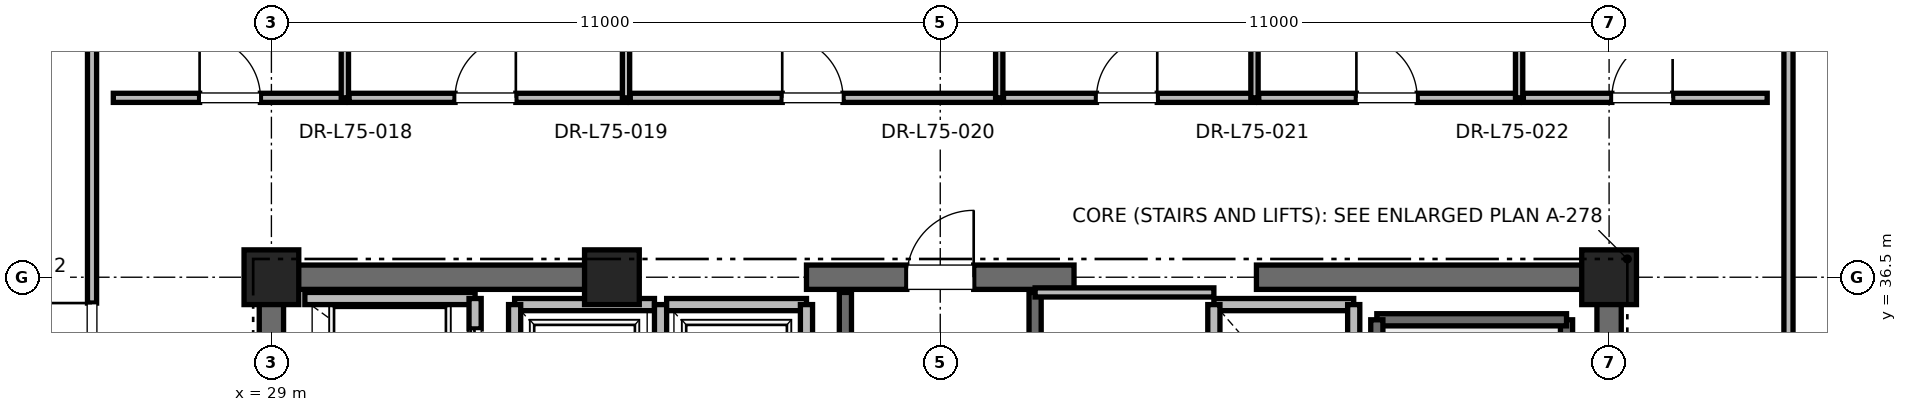
"""IFC4 building model, lengths in metres.
Left out: names, types, materials, properties, quantities, classifications, styles, units other than length and angle.
Written with IfcOpenShell. Run it as: python <this file> out.ifc"""

import sys

from ifc_helpers import new_model, si_unit, direction, frame, frame_2d, origin, origin_2d, place, context, subcontext, project, spatial, rectangle, extrude, element, fill, save


model = new_model("IFC4")
c1 = context("Model", 3, precision=1e-05, world=origin(), true_north=direction((0.0, 1.0)))
c2 = subcontext(c1, "Body", "Model", "MODEL_VIEW")
j1 = project(units=[si_unit("LENGTHUNIT", "METRE"), si_unit("PLANEANGLEUNIT", "RADIAN")], contexts=[c1])
p1 = place(None, origin())
s1 = spatial("IfcSite", under=j1, at=p1, CompositionType="ELEMENT")
p2 = place(p1, origin())
s2 = spatial("IfcBuilding", under=s1, at=p2, CompositionType="ELEMENT")
p3 = place(p2, frame((0.0, 0.0, 322.8)))
s3 = spatial("IfcBuildingStorey", under=s2, at=p3, CompositionType="ELEMENT", Elevation=322.8)
for number, where, z_axis, x_axis in (
    (1, (29.0, 36.5, 0.0), (0.0, 0.0, 1.0), (1.0, 0.0, 0.0)),
    (2, (51.0, 36.5, 0.0), (0.0, 0.0, 1.0), (1.0, 0.0, 0.0)),
    (3, (34.6, 36.5, 0.0), (0.0, 0.0, 1.0), (1.0, 0.0, 0.0)),
):
    element("IfcColumn", number, at=place(p3, frame(where, z_axis=z_axis, x_axis=x_axis)), inside=s3, PredefinedType="PILASTER", context=c2, shape_type="SweptSolid", body=[
        extrude(rectangle(XDim=0.9, YDim=0.9, at=origin_2d()), origin(), (0.0, 0.0, 1.0), 4.0),
    ])
p4 = place(p3, frame((29.0, 36.5, 0.0), z_axis=(0.0, 0.0, 1.0), x_axis=(1.0, 0.0, 0.0)))
e4 = element("IfcWall", 4, at=p4, inside=s3, PredefinedType="SHEAR", context=c2, shape_type="SweptSolid", body=[
    extrude(rectangle(XDim=5.8, YDim=0.4, at=frame_2d((2.9, 0.0))), origin(), (0.0, 0.0, 1.0), 3.785),
])
p5 = place(p3, frame((37.8, 36.5, 0.0), z_axis=(0.0, 0.0, 1.0), x_axis=(1.0, 0.0, 0.0)))
e5 = element("IfcWall", 5, at=p5, inside=s3, PredefinedType="SHEAR", context=c2, shape_type="SweptSolid", body=[
    extrude(rectangle(XDim=4.4, YDim=0.4, at=frame_2d((2.2, 0.0))), origin(), (0.0, 0.0, 1.0), 3.785),
])
p6 = place(p5, frame((1.65, 0.0, 0.0)))
e6 = element("IfcOpeningElement", 6, at=p6, cuts=e5, PredefinedType="OPENING", context=c2, shape_type="SweptSolid", body=[
    extrude(rectangle(XDim=1.1, YDim=2.15, at=frame_2d((0.55, 1.075))), frame((0.0, 0.2, 0.0), z_axis=(0.0, -1.0, 0.0), x_axis=(1.0, 0.0, 0.0)), (0.0, 0.0, 1.0), 0.4),
])
for number, where, z_axis, x_axis in (
    (7, (45.2, 36.5, 0.0), (0.0, 0.0, 1.0), (1.0, 0.0, 0.0)),
    (8, (29.0, 30.7, 0.0), (0.0, 0.0, 1.0), (0.0, 1.0, 0.0)),
):
    element("IfcWall", number, at=place(p3, frame(where, z_axis=z_axis, x_axis=x_axis)), inside=s3, PredefinedType="SHEAR", context=c2, shape_type="SweptSolid", body=[
        extrude(rectangle(XDim=5.8, YDim=0.4, at=frame_2d((2.9, 0.0))), origin(), (0.0, 0.0, 1.0), 3.785),
    ])
p7 = place(p3, frame((51.0, 27.7, 0.0), z_axis=(0.0, 0.0, 1.0), x_axis=(0.0, 1.0, 0.0)))
e9 = element("IfcWall", 9, at=p7, inside=s3, PredefinedType="SHEAR", context=c2, shape_type="SweptSolid", body=[
    extrude(rectangle(XDim=8.8, YDim=0.4, at=frame_2d((4.4, 0.0))), origin(), (0.0, 0.0, 1.0), 3.785),
])
p8 = place(p3, frame((50.3, 27.65, 0.0), z_axis=(0.0, 0.0, 1.0), x_axis=(0.0, 1.0, 0.0)))
e10 = element("IfcWall", 10, at=p8, inside=s3, PredefinedType="SOLIDWALL", context=c2, shape_type="SweptSolid", body=[
    extrude(rectangle(XDim=8.15, YDim=0.2, at=frame_2d((4.075, 0.0))), origin(), (0.0, 0.0, 1.0), 3.785),
])
p9 = place(p3, frame((47.18, 35.8, 0.0), z_axis=(0.0, 0.0, 1.0), x_axis=(1.0, 0.0, 0.0)))
e11 = element("IfcWall", 11, at=p9, inside=s3, PredefinedType="SOLIDWALL", context=c2, shape_type="SweptSolid", body=[
    extrude(rectangle(XDim=3.12, YDim=0.2, at=frame_2d((1.56, 0.0))), origin(), (0.0, 0.0, 1.0), 3.785),
])
p10 = place(p3, frame((47.18, 27.62, 0.0), z_axis=(0.0, 0.0, 1.0), x_axis=(0.0, 1.0, 0.0)))
e12 = element("IfcWall", 12, at=p10, inside=s3, PredefinedType="SOLIDWALL", context=c2, shape_type="SweptSolid", body=[
    extrude(rectangle(XDim=8.18, YDim=0.2, at=frame_2d((4.09, 0.0))), origin(), (0.0, 0.0, 1.0), 3.785),
])
p11 = place(p3, frame((38.44, 27.38, 0.0), z_axis=(0.0, 0.0, 1.0), x_axis=(0.0, 1.0, 0.0)))
e13 = element("IfcWall", 13, at=p11, inside=s3, PredefinedType="SOLIDWALL", context=c2, shape_type="SweptSolid", body=[
    extrude(rectangle(XDim=8.87, YDim=0.2, at=frame_2d((4.435, 0.0))), origin(), (0.0, 0.0, 1.0), 3.785),
])
p12 = place(p3, frame((41.56, 27.68, 0.0), z_axis=(0.0, 0.0, 1.0), x_axis=(0.0, 1.0, 0.0)))
e14 = element("IfcWall", 14, at=p12, inside=s3, PredefinedType="SOLIDWALL", context=c2, shape_type="SweptSolid", body=[
    extrude(rectangle(XDim=8.57, YDim=0.2, at=frame_2d((4.285, 0.0))), origin(), (0.0, 0.0, 1.0), 3.785),
])
p13 = place(p3, frame((32.35, 36.15, 0.0), z_axis=(0.0, 0.0, 1.0), x_axis=(-1.0, 0.0, 0.0)))
e15 = element("IfcWall", 15, at=p13, inside=s3, PredefinedType="SOLIDWALL", context=c2, shape_type="SweptSolid", body=[
    extrude(rectangle(XDim=2.8, YDim=0.2, at=frame_2d((1.4, 0.0))), origin(), (0.0, 0.0, 1.0), 3.22),
])
p14 = place(p3, frame((32.35, 34.05, 0.0), z_axis=(0.0, 0.0, 1.0), x_axis=(0.0, 1.0, 0.0)))
e16 = element("IfcWall", 16, at=p14, inside=s3, PredefinedType="SOLIDWALL", context=c2, shape_type="SweptSolid", body=[
    extrude(rectangle(XDim=2.1, YDim=0.2, at=frame_2d((1.05, 0.0))), origin(), (0.0, 0.0, 1.0), 3.785),
])
p15 = place(p14, frame((0.5, 0.0, 0.0)))
e17 = element("IfcOpeningElement", 17, at=p15, cuts=e16, PredefinedType="OPENING", context=c2, shape_type="SweptSolid", body=[
    extrude(rectangle(XDim=1.1, YDim=2.2, at=frame_2d((0.55, 1.1))), frame((0.0, 0.1, 0.0), z_axis=(0.0, -1.0, 0.0), x_axis=(1.0, 0.0, 0.0)), (0.0, 0.0, 1.0), 0.2),
])
p16 = place(p3, frame((35.3, 36.05, 0.0), z_axis=(0.0, 0.0, 1.0), x_axis=(-1.0, 0.0, 0.0)))
e18 = element("IfcWall", 18, at=p16, inside=s3, PredefinedType="SOLIDWALL", context=c2, shape_type="SweptSolid", body=[
    extrude(rectangle(XDim=2.3, YDim=0.2, at=frame_2d((1.15, 0.0))), origin(), (0.0, 0.0, 1.0), 2.865),
])
p17 = place(p3, frame((33.0, 36.05, 0.0), z_axis=(0.0, 0.0, 1.0), x_axis=(0.0, -1.0, 0.0)))
e19 = element("IfcWall", 19, at=p17, inside=s3, PredefinedType="SOLIDWALL", context=c2, shape_type="SweptSolid", body=[
    extrude(rectangle(XDim=2.6, YDim=0.2, at=frame_2d((1.3, 0.0))), origin(), (0.0, 0.0, 1.0), 3.785),
])
p18 = place(p3, frame((35.4, 33.45, 0.0), z_axis=(0.0, 0.0, 1.0), x_axis=(0.0, 1.0, 0.0)))
e20 = element("IfcWall", 20, at=p18, inside=s3, PredefinedType="SOLIDWALL", context=c2, shape_type="SweptSolid", body=[
    extrude(rectangle(XDim=2.6, YDim=0.2, at=frame_2d((1.3, 0.0))), origin(), (0.0, 0.0, 1.0), 2.865),
])
p19 = place(p3, frame((37.8, 36.05, 0.0), z_axis=(0.0, 0.0, 1.0), x_axis=(-1.0, 0.0, 0.0)))
e21 = element("IfcWall", 21, at=p19, inside=s3, PredefinedType="SOLIDWALL", context=c2, shape_type="SweptSolid", body=[
    extrude(rectangle(XDim=2.3, YDim=0.2, at=frame_2d((1.15, 0.0))), origin(), (0.0, 0.0, 1.0), 2.865),
])
p20 = place(p3, frame((37.8, 33.45, 0.0), z_axis=(0.0, 0.0, 1.0), x_axis=(0.0, 1.0, 0.0)))
e22 = element("IfcWall", 22, at=p20, inside=s3, PredefinedType="SOLIDWALL", context=c2, shape_type="SweptSolid", body=[
    extrude(rectangle(XDim=2.6, YDim=0.2, at=frame_2d((1.3, 0.0))), origin(), (0.0, 0.0, 1.0), 2.865),
])
p21 = place(p3, frame((46.8, 36.05, 0.0), z_axis=(0.0, 0.0, 1.0), x_axis=(-1.0, 0.0, 0.0)))
e23 = element("IfcWall", 23, at=p21, inside=s3, PredefinedType="SOLIDWALL", context=c2, shape_type="SweptSolid", body=[
    extrude(rectangle(XDim=2.3, YDim=0.2, at=frame_2d((1.15, 0.0))), origin(), (0.0, 0.0, 1.0), 2.865),
])
p22 = place(p3, frame((44.5, 36.05, 0.0), z_axis=(0.0, 0.0, 1.0), x_axis=(0.0, -1.0, 0.0)))
e24 = element("IfcWall", 24, at=p22, inside=s3, PredefinedType="SOLIDWALL", context=c2, shape_type="SweptSolid", body=[
    extrude(rectangle(XDim=2.6, YDim=0.2, at=frame_2d((1.3, 0.0))), origin(), (0.0, 0.0, 1.0), 2.865),
])
p23 = place(p3, frame((46.8, 33.45, 0.0), z_axis=(0.0, 0.0, 1.0), x_axis=(0.0, 1.0, 0.0)))
e25 = element("IfcWall", 25, at=p23, inside=s3, PredefinedType="SOLIDWALL", context=c2, shape_type="SweptSolid", body=[
    extrude(rectangle(XDim=2.6, YDim=0.2, at=frame_2d((1.3, 0.0))), origin(), (0.0, 0.0, 1.0), 3.785),
])
p24 = place(p3, frame((41.56, 36.25, 0.0), z_axis=(0.0, 0.0, 1.0), x_axis=(1.0, 0.0, 0.0)))
e26 = element("IfcWall", 26, at=p24, inside=s3, PredefinedType="PARTITIONING", context=c2, shape_type="SweptSolid", body=[
    extrude(rectangle(XDim=2.94, YDim=0.15, at=frame_2d((1.47, 0.0))), origin(), (0.0, 0.0, 1.0), 2.85),
])
p25 = place(p3, frame((26.4, 39.45, 0.0), z_axis=(0.0, 0.0, 1.0), x_axis=(1.0, 0.0, 0.0)))
e27 = element("IfcWall", 27, at=p25, inside=s3, PredefinedType="PARTITIONING", context=c2, shape_type="SweptSolid", body=[
    extrude(rectangle(XDim=3.808, YDim=0.15, at=frame_2d((1.904, 0.0))), origin(), (0.0, 0.0, 1.0), 2.85),
])
p26 = place(p25, frame((1.419, 0.0, 0.0)))
e28 = element("IfcOpeningElement", 28, at=p26, cuts=e27, PredefinedType="OPENING", context=c2, shape_type="SweptSolid", body=[
    extrude(rectangle(XDim=1.0, YDim=2.15, at=frame_2d((0.5, 1.075))), frame((0.0, 0.075, 0.0), z_axis=(0.0, -1.0, 0.0), x_axis=(1.0, 0.0, 0.0)), (0.0, 0.0, 1.0), 0.15),
])
p27 = place(p3, frame((30.208, 39.45, 0.0), z_axis=(0.0, 0.0, 1.0), x_axis=(0.0, 1.0, 0.0)))
e29 = element("IfcWall", 29, at=p27, inside=s3, PredefinedType="PARTITIONING", context=c2, shape_type="SweptSolid", body=[
    extrude(rectangle(XDim=9.6, YDim=0.12, at=frame_2d((4.8, 0.0))), origin(), (0.0, 0.0, 1.0), 2.415),
])
p28 = place(p3, frame((30.278, 39.45, 0.0), z_axis=(0.0, 0.0, 1.0), x_axis=(1.0, 0.0, 0.0)))
e30 = element("IfcWall", 30, at=p28, inside=s3, PredefinedType="PARTITIONING", context=c2, shape_type="SweptSolid", body=[
    extrude(rectangle(XDim=4.554, YDim=0.15, at=frame_2d((2.277, 0.0))), origin(), (0.0, 0.0, 1.0), 2.85),
])
p29 = place(p28, frame((1.742, 0.0, 0.0)))
e31 = element("IfcOpeningElement", 31, at=p29, cuts=e30, PredefinedType="OPENING", context=c2, shape_type="SweptSolid", body=[
    extrude(rectangle(XDim=1.0, YDim=2.15, at=frame_2d((0.5, 1.075))), frame((0.0, 0.075, 0.0), z_axis=(0.0, -1.0, 0.0), x_axis=(1.0, 0.0, 0.0)), (0.0, 0.0, 1.0), 0.15),
])
p30 = place(p3, frame((34.832, 39.45, 0.0), z_axis=(0.0, 0.0, 1.0), x_axis=(0.0, 1.0, 0.0)))
e32 = element("IfcWall", 32, at=p30, inside=s3, PredefinedType="PARTITIONING", context=c2, shape_type="SweptSolid", body=[
    extrude(rectangle(XDim=9.6, YDim=0.12, at=frame_2d((4.8, 0.0))), origin(), (0.0, 0.0, 1.0), 2.415),
])
p31 = place(p3, frame((34.902, 39.45, 0.0), z_axis=(0.0, 0.0, 1.0), x_axis=(1.0, 0.0, 0.0)))
e33 = element("IfcWall", 33, at=p31, inside=s3, PredefinedType="PARTITIONING", context=c2, shape_type="SweptSolid", body=[
    extrude(rectangle(XDim=6.068, YDim=0.15, at=frame_2d((3.034, 0.0))), origin(), (0.0, 0.0, 1.0), 2.85),
])
p32 = place(p31, frame((2.499, 0.0, 0.0)))
e34 = element("IfcOpeningElement", 34, at=p32, cuts=e33, PredefinedType="OPENING", context=c2, shape_type="SweptSolid", body=[
    extrude(rectangle(XDim=1.0, YDim=2.15, at=frame_2d((0.5, 1.075))), frame((0.0, 0.075, 0.0), z_axis=(0.0, -1.0, 0.0), x_axis=(1.0, 0.0, 0.0)), (0.0, 0.0, 1.0), 0.15),
])
p33 = place(p3, frame((40.97, 39.45, 0.0), z_axis=(0.0, 0.0, 1.0), x_axis=(0.0, 1.0, 0.0)))
e35 = element("IfcWall", 35, at=p33, inside=s3, PredefinedType="PARTITIONING", context=c2, shape_type="SweptSolid", body=[
    extrude(rectangle(XDim=9.6, YDim=0.12, at=frame_2d((4.8, 0.0))), origin(), (0.0, 0.0, 1.0), 2.415),
])
p34 = place(p3, frame((41.04, 39.45, 0.0), z_axis=(0.0, 0.0, 1.0), x_axis=(1.0, 0.0, 0.0)))
e36 = element("IfcWall", 36, at=p34, inside=s3, PredefinedType="PARTITIONING", context=c2, shape_type="SweptSolid", body=[
    extrude(rectangle(XDim=4.128, YDim=0.15, at=frame_2d((2.064, 0.0))), origin(), (0.0, 0.0, 1.0), 2.85),
])
p35 = place(p34, frame((1.529, 0.0, 0.0)))
e37 = element("IfcOpeningElement", 37, at=p35, cuts=e36, PredefinedType="OPENING", context=c2, shape_type="SweptSolid", body=[
    extrude(rectangle(XDim=1.0, YDim=2.15, at=frame_2d((0.5, 1.075))), frame((0.0, 0.075, 0.0), z_axis=(0.0, -1.0, 0.0), x_axis=(1.0, 0.0, 0.0)), (0.0, 0.0, 1.0), 0.15),
])
p36 = place(p3, frame((45.168, 39.45, 0.0), z_axis=(0.0, 0.0, 1.0), x_axis=(0.0, 1.0, 0.0)))
e38 = element("IfcWall", 38, at=p36, inside=s3, PredefinedType="PARTITIONING", context=c2, shape_type="SweptSolid", body=[
    extrude(rectangle(XDim=9.6, YDim=0.12, at=frame_2d((4.8, 0.0))), origin(), (0.0, 0.0, 1.0), 2.415),
])
p37 = place(p3, frame((45.238, 39.45, 0.0), z_axis=(0.0, 0.0, 1.0), x_axis=(1.0, 0.0, 0.0)))
e39 = element("IfcWall", 39, at=p37, inside=s3, PredefinedType="PARTITIONING", context=c2, shape_type="SweptSolid", body=[
    extrude(rectangle(XDim=4.282, YDim=0.15, at=frame_2d((2.141, 0.0))), origin(), (0.0, 0.0, 1.0), 2.85),
])
p38 = place(p37, frame((1.606, 0.0, 0.0)))
e40 = element("IfcOpeningElement", 40, at=p38, cuts=e39, PredefinedType="OPENING", context=c2, shape_type="SweptSolid", body=[
    extrude(rectangle(XDim=1.0, YDim=2.15, at=frame_2d((0.5, 1.075))), frame((0.0, 0.075, 0.0), z_axis=(0.0, -1.0, 0.0), x_axis=(1.0, 0.0, 0.0)), (0.0, 0.0, 1.0), 0.15),
])
p39 = place(p3, frame((49.52, 39.45, 0.0), z_axis=(0.0, 0.0, 1.0), x_axis=(0.0, 1.0, 0.0)))
e41 = element("IfcWall", 41, at=p39, inside=s3, PredefinedType="PARTITIONING", context=c2, shape_type="SweptSolid", body=[
    extrude(rectangle(XDim=9.6, YDim=0.12, at=frame_2d((4.8, 0.0))), origin(), (0.0, 0.0, 1.0), 2.415),
])
p40 = place(p3, frame((49.59, 39.45, 0.0), z_axis=(0.0, 0.0, 1.0), x_axis=(1.0, 0.0, 0.0)))
e42 = element("IfcWall", 42, at=p40, inside=s3, PredefinedType="PARTITIONING", context=c2, shape_type="SweptSolid", body=[
    extrude(rectangle(XDim=4.01, YDim=0.15, at=frame_2d((2.005, 0.0))), origin(), (0.0, 0.0, 1.0), 2.85),
])
p41 = place(p40, frame((1.455, 0.0, 0.0)))
e43 = element("IfcOpeningElement", 43, at=p41, cuts=e42, PredefinedType="OPENING", context=c2, shape_type="SweptSolid", body=[
    extrude(rectangle(XDim=1.0, YDim=2.15, at=frame_2d((0.5, 1.075))), frame((0.0, 0.075, 0.0), z_axis=(0.0, -1.0, 0.0), x_axis=(1.0, 0.0, 0.0)), (0.0, 0.0, 1.0), 0.15),
])
p42 = place(p3, frame((26.05, 34.75, 0.0), z_axis=(0.0, 0.0, 1.0), x_axis=(0.0, 1.0, 0.0)))
e44 = element("IfcWall", 44, at=p42, inside=s3, PredefinedType="PARTITIONING", context=c2, shape_type="SweptSolid", body=[
    extrude(rectangle(XDim=10.7, YDim=0.15, at=frame_2d((5.35, 0.0))), origin(), (0.0, 0.0, 1.0), 2.85),
])
p43 = place(p42, frame((0.325, 0.0, 0.0)))
e45 = element("IfcOpeningElement", 45, at=p43, cuts=e44, PredefinedType="OPENING", context=c2, shape_type="SweptSolid", body=[
    extrude(rectangle(XDim=1.0, YDim=2.15, at=frame_2d((0.5, 1.075))), frame((0.0, 0.075, 0.0), z_axis=(0.0, -1.0, 0.0), x_axis=(1.0, 0.0, 0.0)), (0.0, 0.0, 1.0), 0.15),
])
p44 = place(p3, frame((53.95, 24.698, 0.0), z_axis=(0.0, 0.0, 1.0), x_axis=(0.0, 1.0, 0.0)))
e46 = element("IfcWall", 46, at=p44, inside=s3, PredefinedType="PARTITIONING", context=c2, shape_type="SweptSolid", body=[
    extrude(rectangle(XDim=20.752, YDim=0.15, at=frame_2d((10.376, 0.0))), origin(), (0.0, 0.0, 1.0), 2.85),
])
p45 = place(p44, frame((5.351, 0.0, 0.0)))
e47 = element("IfcOpeningElement", 47, at=p45, cuts=e46, PredefinedType="OPENING", context=c2, shape_type="SweptSolid", body=[
    extrude(rectangle(XDim=1.0, YDim=2.15, at=frame_2d((0.5, 1.075))), frame((0.0, 0.075, 0.0), z_axis=(0.0, -1.0, 0.0), x_axis=(1.0, 0.0, 0.0)), (0.0, 0.0, 1.0), 0.15),
])
p46 = place(p6, origin())
e48 = element("IfcDoor", 48, at=p46, inside=s3, OperationType="SINGLE_SWING_RIGHT", PredefinedType="DOOR", context=c2, shape_type="SweptSolid", body=[
    extrude(rectangle(XDim=1.1, YDim=2.15, at=frame_2d((0.55, 1.075))), frame((0.0, 0.025, 0.0), z_axis=(0.0, -1.0, 0.0), x_axis=(1.0, 0.0, 0.0)), (0.0, 0.0, 1.0), 0.05),
])
fill(e6, e48)
p47 = place(p15, origin())
e49 = element("IfcDoor", 49, at=p47, inside=s3, OperationType="SLIDING_TO_RIGHT", PredefinedType="DOOR", context=c2, shape_type="SweptSolid", body=[
    extrude(rectangle(XDim=1.1, YDim=2.2, at=frame_2d((0.55, 1.1))), frame((0.0, 0.025, 0.0), z_axis=(0.0, -1.0, 0.0), x_axis=(1.0, 0.0, 0.0)), (0.0, 0.0, 1.0), 0.05),
])
fill(e17, e49)
p48 = place(p26, origin())
e50 = element("IfcDoor", 50, at=p48, inside=s3, OperationType="SINGLE_SWING_LEFT", PredefinedType="DOOR", context=c2, shape_type="SweptSolid", body=[
    extrude(rectangle(XDim=1.0, YDim=2.15, at=frame_2d((0.5, 1.075))), frame((0.0, 0.025, 0.0), z_axis=(0.0, -1.0, 0.0), x_axis=(1.0, 0.0, 0.0)), (0.0, 0.0, 1.0), 0.05),
])
fill(e28, e50)
p49 = place(p29, origin())
e51 = element("IfcDoor", 51, at=p49, inside=s3, OperationType="SINGLE_SWING_RIGHT", PredefinedType="DOOR", context=c2, shape_type="SweptSolid", body=[
    extrude(rectangle(XDim=1.0, YDim=2.15, at=frame_2d((0.5, 1.075))), frame((0.0, 0.025, 0.0), z_axis=(0.0, -1.0, 0.0), x_axis=(1.0, 0.0, 0.0)), (0.0, 0.0, 1.0), 0.05),
])
fill(e31, e51)
p50 = place(p32, origin())
e52 = element("IfcDoor", 52, at=p50, inside=s3, OperationType="SINGLE_SWING_LEFT", PredefinedType="DOOR", context=c2, shape_type="SweptSolid", body=[
    extrude(rectangle(XDim=1.0, YDim=2.15, at=frame_2d((0.5, 1.075))), frame((0.0, 0.025, 0.0), z_axis=(0.0, -1.0, 0.0), x_axis=(1.0, 0.0, 0.0)), (0.0, 0.0, 1.0), 0.05),
])
fill(e34, e52)
p51 = place(p35, origin())
e53 = element("IfcDoor", 53, at=p51, inside=s3, OperationType="SINGLE_SWING_RIGHT", PredefinedType="DOOR", context=c2, shape_type="SweptSolid", body=[
    extrude(rectangle(XDim=1.0, YDim=2.15, at=frame_2d((0.5, 1.075))), frame((0.0, 0.025, 0.0), z_axis=(0.0, -1.0, 0.0), x_axis=(1.0, 0.0, 0.0)), (0.0, 0.0, 1.0), 0.05),
])
fill(e37, e53)
p52 = place(p38, origin())
e54 = element("IfcDoor", 54, at=p52, inside=s3, OperationType="SINGLE_SWING_LEFT", PredefinedType="DOOR", context=c2, shape_type="SweptSolid", body=[
    extrude(rectangle(XDim=1.0, YDim=2.15, at=frame_2d((0.5, 1.075))), frame((0.0, 0.025, 0.0), z_axis=(0.0, -1.0, 0.0), x_axis=(1.0, 0.0, 0.0)), (0.0, 0.0, 1.0), 0.05),
])
fill(e40, e54)
p53 = place(p41, origin())
e55 = element("IfcDoor", 55, at=p53, inside=s3, OperationType="SINGLE_SWING_RIGHT", PredefinedType="DOOR", context=c2, shape_type="SweptSolid", body=[
    extrude(rectangle(XDim=1.0, YDim=2.15, at=frame_2d((0.5, 1.075))), frame((0.0, 0.025, 0.0), z_axis=(0.0, -1.0, 0.0), x_axis=(1.0, 0.0, 0.0)), (0.0, 0.0, 1.0), 0.05),
])
fill(e43, e55)
p54 = place(p43, origin())
e56 = element("IfcDoor", 56, at=p54, inside=s3, OperationType="SINGLE_SWING_RIGHT", PredefinedType="DOOR", context=c2, shape_type="SweptSolid", body=[
    extrude(rectangle(XDim=1.0, YDim=2.15, at=frame_2d((0.5, 1.075))), frame((0.0, 0.025, 0.0), z_axis=(0.0, -1.0, 0.0), x_axis=(1.0, 0.0, 0.0)), (0.0, 0.0, 1.0), 0.05),
])
fill(e45, e56)
save(model, sys.argv[1])
